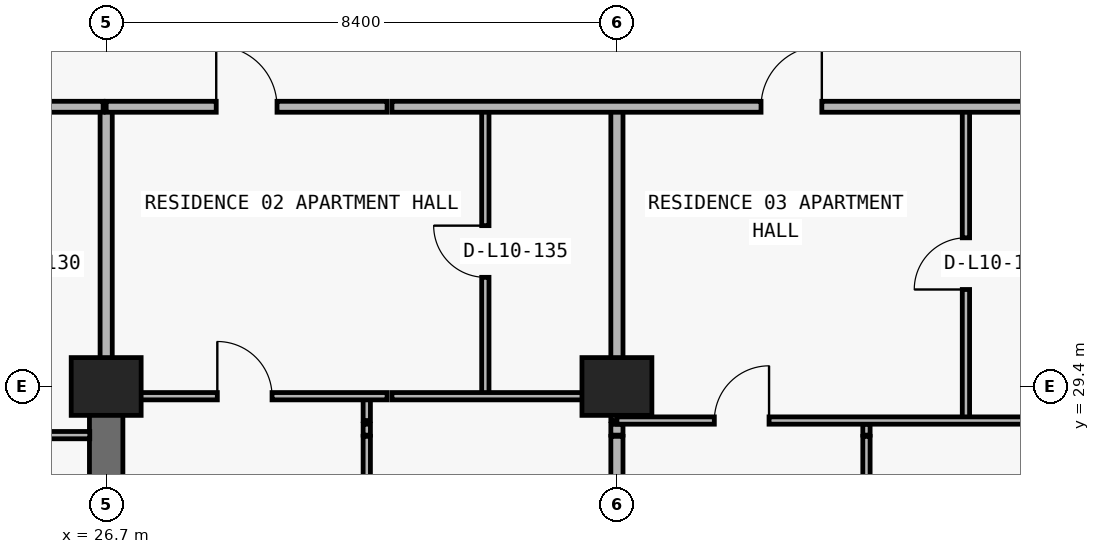
"""IFC4 building model, lengths in metres.
Left out: names, types, materials, properties, quantities, classifications, styles, units other than length and angle.
Written with IfcOpenShell. Run it as: python <this file> out.ifc"""

import sys

from ifc_helpers import new_model, si_unit, direction, frame, frame_2d, origin, origin_2d, place, context, subcontext, project, spatial, rectangle, extrude, element, fill, save


model = new_model("IFC4")
c1 = context("Model", 3, precision=1e-05, world=origin(), true_north=direction((0.0, 1.0)))
c2 = subcontext(c1, "Body", "Model", "MODEL_VIEW")
j1 = project(units=[si_unit("LENGTHUNIT", "METRE"), si_unit("PLANEANGLEUNIT", "RADIAN")], contexts=[c1])
p1 = place(None, origin())
s1 = spatial("IfcSite", under=j1, at=p1, CompositionType="ELEMENT")
p2 = place(p1, origin())
s2 = spatial("IfcBuilding", under=s1, at=p2, CompositionType="ELEMENT")
p3 = place(p2, frame((0.0, 0.0, 43.2)))
s3 = spatial("IfcBuildingStorey", under=s2, at=p3, CompositionType="ELEMENT", Elevation=43.2)
for number, where, z_axis, x_axis in (
    (1, (26.7, 29.4, 0.0), (0.0, 0.0, 1.0), (1.0, 0.0, 0.0)),
    (2, (35.1, 29.4, 0.0), (0.0, 0.0, 1.0), (1.0, 0.0, 0.0)),
):
    element("IfcColumn", number, at=place(p3, frame(where, z_axis=z_axis, x_axis=x_axis)), inside=s3, PredefinedType="COLUMN", context=c2, shape_type="SweptSolid", body=[
        extrude(rectangle(XDim=1.15, YDim=0.95, at=origin_2d()), origin(), (0.0, 0.0, 1.0), 3.05),
    ])
p4 = place(p3, frame((26.7, 20.8, 0.0), z_axis=(0.0, 0.0, 1.0), x_axis=(0.0, 1.0, 0.0)))
e3 = element("IfcWall", 3, at=p4, inside=s3, PredefinedType="SHEAR", context=c2, shape_type="SweptSolid", body=[
    extrude(rectangle(XDim=8.6, YDim=0.55, at=frame_2d((4.3, 0.0))), origin(), (0.0, 0.0, 1.0), 3.05),
])
p5 = place(p3, frame((26.7, 29.405, 0.0), z_axis=(0.0, 0.0, 1.0), x_axis=(0.0, 1.0, 0.0)))
e4 = element("IfcWall", 4, at=p5, inside=s3, PredefinedType="PARTITIONING", context=c2, shape_type="SweptSolid", body=[
    extrude(rectangle(XDim=4.595, YDim=0.2, at=frame_2d((2.297, 0.0))), origin(), (0.0, 0.0, 1.0), 2.335),
])
p6 = place(p3, frame((30.986, 24.2, 0.0), z_axis=(0.0, 0.0, 1.0), x_axis=(0.0, 1.0, 0.0)))
e5 = element("IfcWall", 5, at=p6, inside=s3, PredefinedType="PARTITIONING", context=c2, shape_type="SweptSolid", body=[
    extrude(rectangle(XDim=4.38, YDim=0.12, at=frame_2d((2.19, 0.0))), origin(), (0.0, 0.0, 1.0), 3.05),
])
p7 = place(p6, frame((1.74, 0.0, 0.0)))
e6 = element("IfcOpeningElement", 6, at=p7, cuts=e5, PredefinedType="OPENING", context=c2, shape_type="SweptSolid", body=[
    extrude(rectangle(XDim=0.9, YDim=2.15, at=frame_2d((0.45, 1.075))), frame((0.0, 0.07, 0.0), z_axis=(0.0, -1.0, 0.0), x_axis=(1.0, 0.0, 0.0)), (0.0, 0.0, 1.0), 0.14),
])
p8 = place(p3, frame((30.986, 28.6, 0.0), z_axis=(0.0, 0.0, 1.0), x_axis=(0.0, 1.0, 0.0)))
e7 = element("IfcWall", 7, at=p8, inside=s3, PredefinedType="PARTITIONING", context=c2, shape_type="SweptSolid", body=[
    extrude(rectangle(XDim=0.18, YDim=0.12, at=frame_2d((0.09, 0.0))), origin(), (0.0, 0.0, 1.0), 3.05),
])
p9 = place(p3, frame((30.986, 28.84, 0.0), z_axis=(0.0, 0.0, 1.0), x_axis=(0.0, 1.0, 0.0)))
e8 = element("IfcWall", 8, at=p9, inside=s3, PredefinedType="PARTITIONING", context=c2, shape_type="SweptSolid", body=[
    extrude(rectangle(XDim=0.4, YDim=0.12, at=frame_2d((0.2, 0.0))), origin(), (0.0, 0.0, 1.0), 3.05),
])
p10 = place(p3, frame((32.936, 29.24, 0.0), z_axis=(0.0, 0.0, 1.0), x_axis=(0.0, 1.0, 0.0)))
e9 = element("IfcWall", 9, at=p10, inside=s3, PredefinedType="PARTITIONING", context=c2, shape_type="SweptSolid", body=[
    extrude(rectangle(XDim=4.76, YDim=0.12, at=frame_2d((2.38, 0.0))), origin(), (0.0, 0.0, 1.0), 3.05),
])
p11 = place(p10, frame((1.955, 0.0, 0.0)))
e10 = element("IfcOpeningElement", 10, at=p11, cuts=e9, PredefinedType="OPENING", context=c2, shape_type="SweptSolid", body=[
    extrude(rectangle(XDim=0.85, YDim=2.1, at=frame_2d((0.425, 1.05))), frame((0.0, 0.07, 0.0), z_axis=(0.0, -1.0, 0.0), x_axis=(1.0, 0.0, 0.0)), (0.0, 0.0, 1.0), 0.14),
])
p12 = place(p3, frame((35.1, 24.2, 0.0), z_axis=(0.0, 0.0, 1.0), x_axis=(0.0, 1.0, 0.0)))
e11 = element("IfcWall", 11, at=p12, inside=s3, PredefinedType="PARTITIONING", context=c2, shape_type="SweptSolid", body=[
    extrude(rectangle(XDim=4.38, YDim=0.2, at=frame_2d((2.19, 0.0))), origin(), (0.0, 0.0, 1.0), 2.11),
])
p13 = place(p3, frame((35.1, 28.6, 0.0), z_axis=(0.0, 0.0, 1.0), x_axis=(0.0, 1.0, 0.0)))
e12 = element("IfcWall", 12, at=p13, inside=s3, PredefinedType="PARTITIONING", context=c2, shape_type="SweptSolid", body=[
    extrude(rectangle(XDim=0.18, YDim=0.2, at=frame_2d((0.09, 0.0))), origin(), (0.0, 0.0, 1.0), 2.11),
])
p14 = place(p3, frame((35.1, 28.84, 0.0), z_axis=(0.0, 0.0, 1.0), x_axis=(0.0, 1.0, 0.0)))
e13 = element("IfcWall", 13, at=p14, inside=s3, PredefinedType="PARTITIONING", context=c2, shape_type="SweptSolid", body=[
    extrude(rectangle(XDim=5.16, YDim=0.2, at=frame_2d((2.58, 0.0))), origin(), (0.0, 0.0, 1.0), 2.11),
])
p15 = place(p3, frame((39.204, 24.2, 0.0), z_axis=(0.0, 0.0, 1.0), x_axis=(0.0, 1.0, 0.0)))
e14 = element("IfcWall", 14, at=p15, inside=s3, PredefinedType="PARTITIONING", context=c2, shape_type="SweptSolid", body=[
    extrude(rectangle(XDim=4.38, YDim=0.12, at=frame_2d((2.19, 0.0))), origin(), (0.0, 0.0, 1.0), 3.05),
])
p16 = place(p15, frame((1.74, 0.0, 0.0)))
e15 = element("IfcOpeningElement", 15, at=p16, cuts=e14, PredefinedType="OPENING", context=c2, shape_type="SweptSolid", body=[
    extrude(rectangle(XDim=0.9, YDim=2.15, at=frame_2d((0.45, 1.075))), frame((0.0, 0.07, 0.0), z_axis=(0.0, -1.0, 0.0), x_axis=(1.0, 0.0, 0.0)), (0.0, 0.0, 1.0), 0.14),
])
p17 = place(p3, frame((39.204, 28.6, 0.0), z_axis=(0.0, 0.0, 1.0), x_axis=(0.0, 1.0, 0.0)))
e16 = element("IfcWall", 16, at=p17, inside=s3, PredefinedType="PARTITIONING", context=c2, shape_type="SweptSolid", body=[
    extrude(rectangle(XDim=0.18, YDim=0.12, at=frame_2d((0.09, 0.0))), origin(), (0.0, 0.0, 1.0), 3.05),
])
p18 = place(p3, frame((40.84, 28.84, 0.0), z_axis=(0.0, 0.0, 1.0), x_axis=(0.0, 1.0, 0.0)))
e17 = element("IfcWall", 17, at=p18, inside=s3, PredefinedType="PARTITIONING", context=c2, shape_type="SweptSolid", body=[
    extrude(rectangle(XDim=5.16, YDim=0.12, at=frame_2d((2.58, 0.0))), origin(), (0.0, 0.0, 1.0), 3.05),
])
p19 = place(p18, frame((2.155, 0.0, 0.0)))
e18 = element("IfcOpeningElement", 18, at=p19, cuts=e17, PredefinedType="OPENING", context=c2, shape_type="SweptSolid", body=[
    extrude(rectangle(XDim=0.85, YDim=2.1, at=frame_2d((0.425, 1.05))), frame((0.0, 0.07, 0.0), z_axis=(0.0, -1.0, 0.0), x_axis=(1.0, 0.0, 0.0)), (0.0, 0.0, 1.0), 0.14),
])
p20 = place(p3, frame((18.3, 28.6, 0.0), z_axis=(0.0, 0.0, 1.0), x_axis=(1.0, 0.0, 0.0)))
e19 = element("IfcWall", 19, at=p20, inside=s3, PredefinedType="PARTITIONING", context=c2, shape_type="SweptSolid", body=[
    extrude(rectangle(XDim=8.13, YDim=0.12, at=frame_2d((4.065, 0.0))), origin(), (0.0, 0.0, 1.0), 3.05),
])
p21 = place(p20, frame((2.861, 0.0, 0.0)))
e20 = element("IfcOpeningElement", 20, at=p21, cuts=e19, PredefinedType="OPENING", context=c2, shape_type="SweptSolid", body=[
    extrude(rectangle(XDim=0.9, YDim=2.15, at=frame_2d((0.45, 1.075))), frame((0.0, 0.07, 0.0), z_axis=(0.0, -1.0, 0.0), x_axis=(1.0, 0.0, 0.0)), (0.0, 0.0, 1.0), 0.14),
])
p22 = place(p3, frame((35.1, 28.84, 0.0), z_axis=(0.0, 0.0, 1.0), x_axis=(1.0, 0.0, 0.0)))
e21 = element("IfcWall", 21, at=p22, inside=s3, PredefinedType="PARTITIONING", context=c2, shape_type="SweptSolid", body=[
    extrude(rectangle(XDim=7.6, YDim=0.12, at=frame_2d((3.8, 0.0))), origin(), (0.0, 0.0, 1.0), 3.05),
])
p23 = place(p22, frame((1.602, 0.0, 0.0)))
e22 = element("IfcOpeningElement", 22, at=p23, cuts=e21, PredefinedType="OPENING", context=c2, shape_type="SweptSolid", body=[
    extrude(rectangle(XDim=0.9, YDim=2.15, at=frame_2d((0.45, 1.075))), frame((0.0, 0.07, 0.0), z_axis=(0.0, -1.0, 0.0), x_axis=(1.0, 0.0, 0.0)), (0.0, 0.0, 1.0), 0.14),
])
p24 = place(p3, frame((26.97, 29.24, 0.0), z_axis=(0.0, 0.0, 1.0), x_axis=(1.0, 0.0, 0.0)))
e23 = element("IfcWall", 23, at=p24, inside=s3, PredefinedType="PARTITIONING", context=c2, shape_type="SweptSolid", body=[
    extrude(rectangle(XDim=4.35, YDim=0.12, at=frame_2d((2.175, 0.0))), origin(), (0.0, 0.0, 1.0), 2.11),
])
p25 = place(p24, frame((1.558, 0.0, 0.0)))
e24 = element("IfcOpeningElement", 24, at=p25, cuts=e23, PredefinedType="OPENING", context=c2, shape_type="SweptSolid", body=[
    extrude(rectangle(XDim=0.9, YDim=2.06, at=frame_2d((0.45, 1.03))), frame((0.0, 0.07, 0.0), z_axis=(0.0, -1.0, 0.0), x_axis=(1.0, 0.0, 0.0)), (0.0, 0.0, 1.0), 0.14),
])
p26 = place(p3, frame((31.4, 29.24, 0.0), z_axis=(0.0, 0.0, 1.0), x_axis=(1.0, 0.0, 0.0)))
e25 = element("IfcWall", 25, at=p26, inside=s3, PredefinedType="PARTITIONING", context=c2, shape_type="SweptSolid", body=[
    extrude(rectangle(XDim=3.7, YDim=0.12, at=frame_2d((1.85, 0.0))), origin(), (0.0, 0.0, 1.0), 2.11),
])
p27 = place(p3, frame((5.105, 34.0, 0.0), z_axis=(0.0, 0.0, 1.0), x_axis=(1.0, 0.0, 0.0)))
e26 = element("IfcWall", 26, at=p27, inside=s3, PredefinedType="PARTITIONING", context=c2, shape_type="SweptSolid", body=[
    extrude(rectangle(XDim=21.545, YDim=0.18, at=frame_2d((10.772, 0.0))), origin(), (0.0, 0.0, 1.0), 3.05),
])
p28 = place(p27, frame((7.504, 0.0, 0.0)))
e27 = element("IfcOpeningElement", 27, at=p28, cuts=e26, PredefinedType="OPENING", context=c2, shape_type="SweptSolid", body=[
    extrude(rectangle(XDim=1.0, YDim=2.2, at=frame_2d((0.5, 1.1))), frame((0.0, 0.1, 0.0), z_axis=(0.0, -1.0, 0.0), x_axis=(1.0, 0.0, 0.0)), (0.0, 0.0, 1.0), 0.2),
])
p29 = place(p3, frame((26.7, 34.0, 0.0), z_axis=(0.0, 0.0, 1.0), x_axis=(1.0, 0.0, 0.0)))
e28 = element("IfcWall", 28, at=p29, inside=s3, PredefinedType="PARTITIONING", context=c2, shape_type="SweptSolid", body=[
    extrude(rectangle(XDim=4.62, YDim=0.18, at=frame_2d((2.31, 0.0))), origin(), (0.0, 0.0, 1.0), 3.05),
])
p30 = place(p29, frame((1.81, 0.0, 0.0)))
e29 = element("IfcOpeningElement", 29, at=p30, cuts=e28, PredefinedType="OPENING", context=c2, shape_type="SweptSolid", body=[
    extrude(rectangle(XDim=1.0, YDim=2.2, at=frame_2d((0.5, 1.1))), frame((0.0, 0.1, 0.0), z_axis=(0.0, -1.0, 0.0), x_axis=(1.0, 0.0, 0.0)), (0.0, 0.0, 1.0), 0.2),
])
p31 = place(p3, frame((31.4, 34.0, 0.0), z_axis=(0.0, 0.0, 1.0), x_axis=(1.0, 0.0, 0.0)))
e30 = element("IfcWall", 30, at=p31, inside=s3, PredefinedType="PARTITIONING", context=c2, shape_type="SweptSolid", body=[
    extrude(rectangle(XDim=41.3, YDim=0.18, at=frame_2d((20.65, 0.0))), origin(), (0.0, 0.0, 1.0), 3.05),
])
p32 = place(p31, frame((6.07, 0.0, 0.0)))
e31 = element("IfcOpeningElement", 31, at=p32, cuts=e30, PredefinedType="OPENING", context=c2, shape_type="SweptSolid", body=[
    extrude(rectangle(XDim=1.0, YDim=2.2, at=frame_2d((0.5, 1.1))), frame((0.0, 0.1, 0.0), z_axis=(0.0, -1.0, 0.0), x_axis=(1.0, 0.0, 0.0)), (0.0, 0.0, 1.0), 0.2),
])
p33 = place(p31, frame((13.945, 0.0, 0.0)))
e32 = element("IfcOpeningElement", 32, at=p33, cuts=e30, PredefinedType="OPENING", context=c2, shape_type="SweptSolid", body=[
    extrude(rectangle(XDim=1.0, YDim=2.2, at=frame_2d((0.5, 1.1))), frame((0.0, 0.1, 0.0), z_axis=(0.0, -1.0, 0.0), x_axis=(1.0, 0.0, 0.0)), (0.0, 0.0, 1.0), 0.2),
])
p34 = place(p31, frame((22.414, 0.0, 0.0)))
e33 = element("IfcOpeningElement", 33, at=p34, cuts=e30, PredefinedType="OPENING", context=c2, shape_type="SweptSolid", body=[
    extrude(rectangle(XDim=1.0, YDim=2.2, at=frame_2d((0.5, 1.1))), frame((0.0, 0.1, 0.0), z_axis=(0.0, -1.0, 0.0), x_axis=(1.0, 0.0, 0.0)), (0.0, 0.0, 1.0), 0.2),
])
p35 = place(p30, origin())
e34 = element("IfcDoor", 34, at=p35, inside=s3, OperationType="SINGLE_SWING_LEFT", PredefinedType="DOOR", context=c2, shape_type="SweptSolid", body=[
    extrude(rectangle(XDim=1.0, YDim=2.2, at=frame_2d((0.5, 1.1))), frame((0.0, 0.025, 0.0), z_axis=(0.0, -1.0, 0.0), x_axis=(1.0, 0.0, 0.0)), (0.0, 0.0, 1.0), 0.05),
])
fill(e29, e34)
p36 = place(p11, origin())
e35 = element("IfcDoor", 35, at=p36, inside=s3, OperationType="SINGLE_SWING_RIGHT", PredefinedType="DOOR", context=c2, shape_type="SweptSolid", body=[
    extrude(rectangle(XDim=0.85, YDim=2.1, at=frame_2d((0.425, 1.05))), frame((0.0, 0.025, 0.0), z_axis=(0.0, -1.0, 0.0), x_axis=(1.0, 0.0, 0.0)), (0.0, 0.0, 1.0), 0.05),
])
fill(e10, e35)
p37 = place(p25, origin())
e36 = element("IfcDoor", 36, at=p37, inside=s3, OperationType="SINGLE_SWING_LEFT", PredefinedType="DOOR", context=c2, shape_type="SweptSolid", body=[
    extrude(rectangle(XDim=0.9, YDim=2.06, at=frame_2d((0.45, 1.03))), frame((0.0, 0.025, 0.0), z_axis=(0.0, -1.0, 0.0), x_axis=(1.0, 0.0, 0.0)), (0.0, 0.0, 1.0), 0.05),
])
fill(e24, e36)
p38 = place(p32, origin())
e37 = element("IfcDoor", 37, at=p38, inside=s3, OperationType="SINGLE_SWING_RIGHT", PredefinedType="DOOR", context=c2, shape_type="SweptSolid", body=[
    extrude(rectangle(XDim=1.0, YDim=2.2, at=frame_2d((0.5, 1.1))), frame((0.0, 0.025, 0.0), z_axis=(0.0, -1.0, 0.0), x_axis=(1.0, 0.0, 0.0)), (0.0, 0.0, 1.0), 0.05),
])
fill(e31, e37)
p39 = place(p19, origin())
e38 = element("IfcDoor", 38, at=p39, inside=s3, OperationType="SINGLE_SWING_LEFT", PredefinedType="DOOR", context=c2, shape_type="SweptSolid", body=[
    extrude(rectangle(XDim=0.85, YDim=2.1, at=frame_2d((0.425, 1.05))), frame((0.0, 0.025, 0.0), z_axis=(0.0, -1.0, 0.0), x_axis=(1.0, 0.0, 0.0)), (0.0, 0.0, 1.0), 0.05),
])
fill(e18, e38)
p40 = place(p23, origin())
e39 = element("IfcDoor", 39, at=p40, inside=s3, OperationType="SINGLE_SWING_RIGHT", PredefinedType="DOOR", context=c2, shape_type="SweptSolid", body=[
    extrude(rectangle(XDim=0.9, YDim=2.15, at=frame_2d((0.45, 1.075))), frame((0.0, 0.025, 0.0), z_axis=(0.0, -1.0, 0.0), x_axis=(1.0, 0.0, 0.0)), (0.0, 0.0, 1.0), 0.05),
])
fill(e22, e39)
save(model, sys.argv[1])
